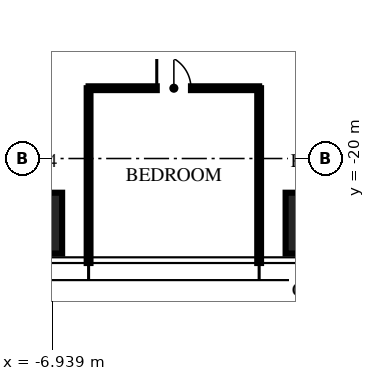
"""IFC4 building model, lengths in metres.
Left out: names, types, materials, properties, quantities, classifications, styles, units other than length and angle.
Written with IfcOpenShell. Run it as: python <this file> out.ifc"""

import sys

from ifc_helpers import new_model, si_unit, direction, frame, frame_2d, origin, origin_2d, place, context, subcontext, project, spatial, rectangle, extrude, element, fill, save


model = new_model("IFC4")
c1 = context("Model", 3, precision=1e-05, world=origin(), true_north=direction((0.0, 1.0)))
c2 = subcontext(c1, "Body", "Model", "MODEL_VIEW")
j1 = project(units=[si_unit("LENGTHUNIT", "METRE"), si_unit("PLANEANGLEUNIT", "RADIAN")], contexts=[c1])
p1 = place(None, origin())
s1 = spatial("IfcSite", under=j1, at=p1, CompositionType="ELEMENT")
p2 = place(p1, origin())
s2 = spatial("IfcBuilding", under=s1, at=p2, CompositionType="ELEMENT")
p3 = place(p2, frame((0.0, 0.0, 345.75)))
s3 = spatial("IfcBuildingStorey", under=s2, at=p3, CompositionType="ELEMENT", Elevation=345.75)
for number, where, z_axis, x_axis in (
    (1, (0.0, -21.7, 0.0), (0.0, 0.0, 1.0), (1.0, 0.0, 0.0)),
    (2, (-7.48, -21.7, 0.0), (0.0, 0.0, 1.0), (1.0, 0.0, 0.0)),
):
    element("IfcColumn", number, at=place(p3, frame(where, z_axis=z_axis, x_axis=x_axis)), inside=s3, PredefinedType="COLUMN", context=c2, shape_type="SweptSolid", body=[
        extrude(rectangle(XDim=1.6, YDim=1.6, at=origin_2d()), origin(), (0.0, 0.0, 1.0), 3.75),
    ])
for number, where, z_axis, x_axis in (
    (3, (-5.984, -18.15, 0.0), (0.0, 0.0, 1.0), (0.0, -1.0, 0.0)),
    (4, (-1.496, -18.15, 0.0), (0.0, 0.0, 1.0), (0.0, -1.0, 0.0)),
):
    element("IfcWall", number, at=place(p3, frame(where, z_axis=z_axis, x_axis=x_axis)), inside=s3, PredefinedType="PARTITIONING", context=c2, shape_type="SweptSolid", body=[
        extrude(rectangle(XDim=4.6, YDim=0.1, at=frame_2d((2.3, 0.0))), origin(), (0.0, 0.0, 1.0), 2.91),
    ])
p4 = place(p3, frame((-5.984, -18.15, 0.0), z_axis=(0.0, 0.0, 1.0), x_axis=(1.0, 0.0, 0.0)))
e5 = element("IfcWall", 5, at=p4, inside=s3, PredefinedType="PARTITIONING", context=c2, shape_type="SweptSolid", body=[
    extrude(rectangle(XDim=4.488, YDim=0.1, at=frame_2d((2.244, 0.0))), origin(), (0.0, 0.0, 1.0), 2.81),
])
p5 = place(p4, frame((1.794, 0.0, 0.0)))
e6 = element("IfcOpeningElement", 6, at=p5, cuts=e5, PredefinedType="OPENING", context=c2, shape_type="SweptSolid", body=[
    extrude(rectangle(XDim=0.9, YDim=2.1, at=frame_2d((0.45, 1.05))), frame((0.0, 0.06, 0.0), z_axis=(0.0, -1.0, 0.0), x_axis=(1.0, 0.0, 0.0)), (0.0, 0.0, 1.0), 0.12),
])
p6 = place(p5, origin())
e7 = element("IfcDoor", 7, at=p6, inside=s3, OperationType="SINGLE_SWING_LEFT", PredefinedType="DOOR", context=c2, shape_type="SweptSolid", body=[
    extrude(rectangle(XDim=0.9, YDim=2.1, at=frame_2d((0.45, 1.05))), frame((0.0, 0.025, 0.0), z_axis=(0.0, -1.0, 0.0), x_axis=(1.0, 0.0, 0.0)), (0.0, 0.0, 1.0), 0.05),
])
fill(e6, e7)
save(model, sys.argv[1])
